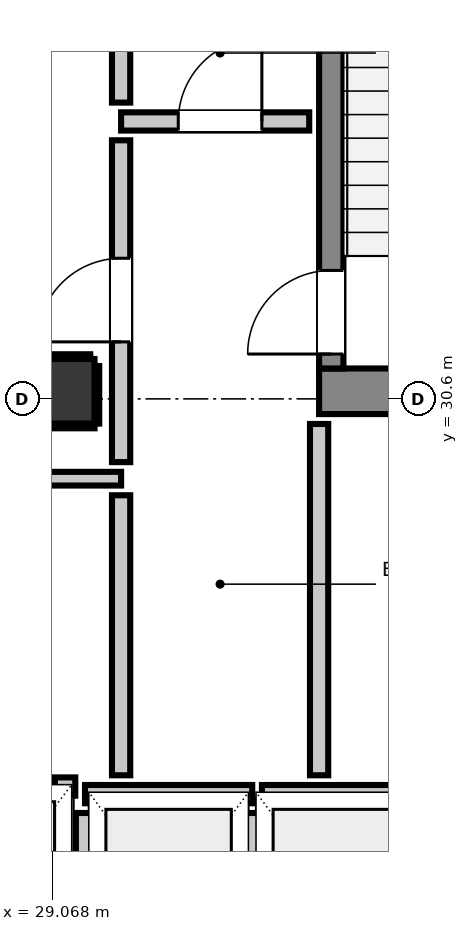
"""IFC4 building model, lengths in metres.
Left out: names, types, materials, properties, quantities, classifications, styles, units other than length and angle.
Written with IfcOpenShell. Run it as: python <this file> out.ifc"""

import sys

from ifc_helpers import new_model, si_unit, direction, frame, frame_2d, origin, origin_2d, place, context, subcontext, project, spatial, rectangle, extrude, element, fill, save


model = new_model("IFC4")
c1 = context("Model", 3, precision=1e-05, world=origin(), true_north=direction((0.0, 1.0)))
c2 = subcontext(c1, "Body", "Model", "MODEL_VIEW")
j1 = project(units=[si_unit("LENGTHUNIT", "METRE"), si_unit("PLANEANGLEUNIT", "RADIAN")], contexts=[c1])
p1 = place(None, origin())
s1 = spatial("IfcSite", under=j1, at=p1, CompositionType="ELEMENT")
p2 = place(p1, origin())
s2 = spatial("IfcBuilding", under=s1, at=p2, CompositionType="ELEMENT")
p3 = place(p2, frame((0.0, 0.0, 183.52)))
s3 = spatial("IfcBuildingStorey", under=s2, at=p3, CompositionType="ELEMENT", Elevation=183.52)
p4 = place(p3, frame((32.58, 30.7, 0.0), z_axis=(0.0, 0.0, 1.0), x_axis=(1.0, 0.0, 0.0)))
e1 = element("IfcWall", 1, at=p4, inside=s3, PredefinedType="SHEAR", context=c2, shape_type="SweptSolid", body=[
    extrude(rectangle(XDim=3.54, YDim=0.6, at=frame_2d((1.77, 0.0))), origin(), (0.0, 0.0, 1.0), 3.32),
])
p5 = place(p3, frame((32.74, 31.0, 0.0), z_axis=(0.0, 0.0, 1.0), x_axis=(0.0, 1.0, 0.0)))
e2 = element("IfcWall", 2, at=p5, inside=s3, PredefinedType="SHEAR", context=c2, shape_type="SweptSolid", body=[
    extrude(rectangle(XDim=7.8, YDim=0.32, at=frame_2d((3.9, 0.0))), origin(), (0.0, 0.0, 1.0), 3.32),
])
p6 = place(p5, frame((0.19, 0.0, 0.0)))
e3 = element("IfcOpeningElement", 3, at=p6, cuts=e2, PredefinedType="OPENING", context=c2, shape_type="SweptSolid", body=[
    extrude(rectangle(XDim=1.1, YDim=2.15, at=frame_2d((0.55, 1.075))), frame((0.0, 0.17, 0.0), z_axis=(0.0, -1.0, 0.0), x_axis=(1.0, 0.0, 0.0)), (0.0, 0.0, 1.0), 0.34),
])
p7 = place(p3, frame((29.2, 30.7, 0.0), z_axis=(0.0, 0.0, 1.0), x_axis=(1.0, 0.0, 0.0)))
e4 = element("IfcColumn", 4, at=p7, inside=s3, PredefinedType="COLUMN", context=c2, shape_type="SweptSolid", body=[
    extrude(rectangle(XDim=0.85, YDim=0.85, at=origin_2d()), origin(), (0.0, 0.0, 1.0), 3.32),
])
p8 = place(p3, frame((29.5, 25.4, 0.0), z_axis=(0.0, 0.0, 1.0), x_axis=(1.0, 0.0, 0.0)))
e5 = element("IfcWall", 5, at=p8, inside=s3, PredefinedType="PARTITIONING", context=c2, shape_type="SweptSolid", body=[
    extrude(rectangle(XDim=2.2, YDim=0.24, at=frame_2d((1.1, 0.0))), origin(), (0.0, 0.0, 1.0), 3.08),
])
p9 = place(p3, frame((29.5, 22.848, 0.0), z_axis=(0.0, 0.0, 1.0), x_axis=(0.0, 1.0, 0.0)))
e6 = element("IfcWall", 6, at=p9, inside=s3, PredefinedType="PARTITIONING", context=c2, shape_type="SweptSolid", body=[
    extrude(rectangle(XDim=2.304, YDim=0.24, at=frame_2d((1.152, 0.0))), origin(), (0.0, 0.0, 1.0), 2.315),
])
p10 = place(p3, frame((31.7, 22.848, 0.0), z_axis=(0.0, 0.0, 1.0), x_axis=(0.0, 1.0, 0.0)))
e7 = element("IfcWall", 7, at=p10, inside=s3, PredefinedType="PARTITIONING", context=c2, shape_type="SweptSolid", body=[
    extrude(rectangle(XDim=2.304, YDim=0.24, at=frame_2d((1.152, 0.0))), origin(), (0.0, 0.0, 1.0), 3.08),
])
p11 = place(p3, frame((31.828, 25.4, 0.0), z_axis=(0.0, 0.0, 1.0), x_axis=(1.0, 0.0, 0.0)))
e8 = element("IfcWall", 8, at=p11, inside=s3, PredefinedType="PARTITIONING", context=c2, shape_type="SweptSolid", body=[
    extrude(rectangle(XDim=2.072, YDim=0.24, at=frame_2d((1.036, 0.0))), origin(), (0.0, 0.0, 1.0), 3.08),
])
p12 = place(p3, frame((29.103, 25.5, 0.0), z_axis=(0.0, 0.0, 1.0), x_axis=(1.0, 0.0, 0.0)))
e9 = element("IfcWall", 9, at=p12, inside=s3, PredefinedType="PARTITIONING", context=c2, shape_type="SweptSolid", body=[
    extrude(rectangle(XDim=0.269, YDim=0.24, at=frame_2d((0.135, 0.0))), origin(), (0.0, 0.0, 1.0), 3.08),
])
p13 = place(p3, frame((29.975, 34.25, 0.0), z_axis=(0.0, 0.0, 1.0), x_axis=(1.0, 0.0, 0.0)))
e10 = element("IfcWall", 10, at=p13, inside=s3, PredefinedType="PARTITIONING", context=c2, shape_type="SweptSolid", body=[
    extrude(rectangle(XDim=2.475, YDim=0.24, at=frame_2d((1.237, 0.0))), origin(), (0.0, 0.0, 1.0), 3.08),
])
p14 = place(p13, frame((0.752, 0.0, 0.0)))
e11 = element("IfcOpeningElement", 11, at=p14, cuts=e10, PredefinedType="OPENING", context=c2, shape_type="SweptSolid", body=[
    extrude(rectangle(XDim=1.1, YDim=2.15, at=frame_2d((0.55, 1.075))), frame((0.0, 0.13, 0.0), z_axis=(0.0, -1.0, 0.0), x_axis=(1.0, 0.0, 0.0)), (0.0, 0.0, 1.0), 0.26),
])
p15 = place(p3, frame((28.593, 29.55, 0.0), z_axis=(0.0, 0.0, 1.0), x_axis=(1.0, 0.0, 0.0)))
e12 = element("IfcWall", 12, at=p15, inside=s3, PredefinedType="PARTITIONING", context=c2, shape_type="SweptSolid", body=[
    extrude(rectangle(XDim=1.382, YDim=0.18, at=frame_2d((0.691, 0.0))), origin(), (0.0, 0.0, 1.0), 3.08),
])
p16 = place(p3, frame((29.975, 25.648, 0.0), z_axis=(0.0, 0.0, 1.0), x_axis=(0.0, 1.0, 0.0)))
e13 = element("IfcWall", 13, at=p16, inside=s3, PredefinedType="PARTITIONING", context=c2, shape_type="SweptSolid", body=[
    extrude(rectangle(XDim=3.684, YDim=0.24, at=frame_2d((1.842, 0.0))), origin(), (0.0, 0.0, 1.0), 3.08),
])
p17 = place(p3, frame((29.975, 29.768, 0.0), z_axis=(0.0, 0.0, 1.0), x_axis=(0.0, 1.0, 0.0)))
e14 = element("IfcWall", 14, at=p17, inside=s3, PredefinedType="PARTITIONING", context=c2, shape_type="SweptSolid", body=[
    extrude(rectangle(XDim=4.234, YDim=0.24, at=frame_2d((2.117, 0.0))), origin(), (0.0, 0.0, 1.0), 3.08),
])
p18 = place(p17, frame((1.582, 0.0, 0.0)))
e15 = element("IfcOpeningElement", 15, at=p18, cuts=e14, PredefinedType="OPENING", context=c2, shape_type="SweptSolid", body=[
    extrude(rectangle(XDim=1.1, YDim=2.15, at=frame_2d((0.55, 1.075))), frame((0.0, 0.13, 0.0), z_axis=(0.0, -1.0, 0.0), x_axis=(1.0, 0.0, 0.0)), (0.0, 0.0, 1.0), 0.26),
])
p19 = place(p3, frame((29.975, 34.498, 0.0), z_axis=(0.0, 0.0, 1.0), x_axis=(0.0, 1.0, 0.0)))
e16 = element("IfcWall", 16, at=p19, inside=s3, PredefinedType="PARTITIONING", context=c2, shape_type="SweptSolid", body=[
    extrude(rectangle(XDim=0.934, YDim=0.24, at=frame_2d((0.467, 0.0))), origin(), (0.0, 0.0, 1.0), 3.08),
])
p20 = place(p3, frame((32.58, 25.648, 0.0), z_axis=(0.0, 0.0, 1.0), x_axis=(0.0, 1.0, 0.0)))
e17 = element("IfcWall", 17, at=p20, inside=s3, PredefinedType="PARTITIONING", context=c2, shape_type="SweptSolid", body=[
    extrude(rectangle(XDim=4.622, YDim=0.24, at=frame_2d((2.311, 0.0))), origin(), (0.0, 0.0, 1.0), 3.08),
])
p21 = place(p3, frame((28.775, 30.243, 0.0), z_axis=(0.0, 0.0, 1.0), x_axis=(1.0, 0.0, 0.0)))
e18 = element("IfcWall", 18, at=p21, inside=s3, PredefinedType="PARTITIONING", context=c2, shape_type="SweptSolid", body=[
    extrude(rectangle(XDim=0.85, YDim=0.06, at=frame_2d((0.425, 0.0))), origin(), (0.0, 0.0, 1.0), 1.45),
])
p22 = place(p3, frame((28.775, 31.157, 0.0), z_axis=(0.0, 0.0, 1.0), x_axis=(1.0, 0.0, 0.0)))
e19 = element("IfcWall", 19, at=p22, inside=s3, PredefinedType="PARTITIONING", context=c2, shape_type="SweptSolid", body=[
    extrude(rectangle(XDim=0.794, YDim=0.06, at=frame_2d((0.397, 0.0))), origin(), (0.0, 0.0, 1.0), 1.45),
])
p23 = place(p3, frame((29.657, 30.275, 0.0), z_axis=(0.0, 0.0, 1.0), x_axis=(0.0, 1.0, 0.0)))
e20 = element("IfcWall", 20, at=p23, inside=s3, PredefinedType="PARTITIONING", context=c2, shape_type="SweptSolid", body=[
    extrude(rectangle(XDim=0.757, YDim=0.06, at=frame_2d((0.378, 0.0))), origin(), (0.0, 0.0, 1.0), 1.45),
])
p24 = place(p6, origin())
e21 = element("IfcDoor", 21, at=p24, inside=s3, OperationType="SINGLE_SWING_LEFT", PredefinedType="DOOR", context=c2, shape_type="SweptSolid", body=[
    extrude(rectangle(XDim=1.1, YDim=2.15, at=frame_2d((0.55, 1.075))), frame((0.0, 0.025, 0.0), z_axis=(0.0, -1.0, 0.0), x_axis=(1.0, 0.0, 0.0)), (0.0, 0.0, 1.0), 0.05),
])
fill(e3, e21)
p25 = place(p18, origin())
e22 = element("IfcDoor", 22, at=p25, inside=s3, OperationType="SINGLE_SWING_LEFT", PredefinedType="DOOR", context=c2, shape_type="SweptSolid", body=[
    extrude(rectangle(XDim=1.1, YDim=2.15, at=frame_2d((0.55, 1.075))), frame((0.0, 0.025, 0.0), z_axis=(0.0, -1.0, 0.0), x_axis=(1.0, 0.0, 0.0)), (0.0, 0.0, 1.0), 0.05),
])
fill(e15, e22)
p26 = place(p14, origin())
e23 = element("IfcDoor", 23, at=p26, inside=s3, OperationType="SINGLE_SWING_RIGHT", PredefinedType="DOOR", context=c2, shape_type="SweptSolid", body=[
    extrude(rectangle(XDim=1.1, YDim=2.15, at=frame_2d((0.55, 1.075))), frame((0.0, 0.025, 0.0), z_axis=(0.0, -1.0, 0.0), x_axis=(1.0, 0.0, 0.0)), (0.0, 0.0, 1.0), 0.05),
])
fill(e11, e23)
save(model, sys.argv[1])
